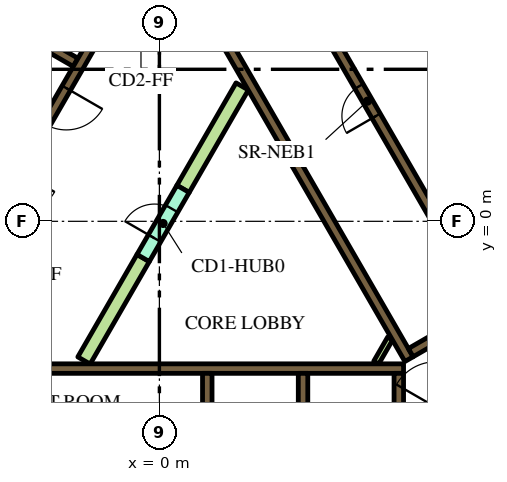
"""IFC4 building model, lengths in metres.
Left out: names, types, materials, properties, quantities, classifications, styles, units other than length and angle.
Written with IfcOpenShell. Run it as: python <this file> out.ifc"""

import sys

from ifc_helpers import new_model, si_unit, direction, frame, frame_2d, origin, place, context, subcontext, project, spatial, polyline, rectangle, outline, extrude, element, fill, save


model = new_model("IFC4")
c1 = context("Model", 3, precision=1e-05, world=origin(), true_north=direction((0.0, 1.0)))
c2 = subcontext(c1, "Body", "Model", "MODEL_VIEW")
j1 = project(units=[si_unit("LENGTHUNIT", "METRE"), si_unit("PLANEANGLEUNIT", "RADIAN")], contexts=[c1])
p1 = place(None, origin())
s1 = spatial("IfcSite", under=j1, at=p1, CompositionType="ELEMENT")
p2 = place(p1, origin())
s2 = spatial("IfcBuilding", under=s1, at=p2, CompositionType="ELEMENT")
p3 = place(p2, frame((0.0, 0.0, 31.5)))
s3 = spatial("IfcBuildingStorey", under=s2, at=p3, CompositionType="ELEMENT", Elevation=31.5)
p4 = place(p3, frame((6.711, 13.476, 0.0), z_axis=(0.0, 0.0, 1.0), x_axis=(0.500002723396, -0.866023831425, 0.0)))
e1 = element("IfcWall", 1, at=p4, inside=s3, PredefinedType="SOLIDWALL", context=c2, shape_type="SweptSolid", body=[
    extrude(rectangle(XDim=20.334, YDim=0.9, at=frame_2d((10.167, 0.0))), origin(), (0.0, 0.0, 1.0), 3.9),
])
p5 = place(p3, frame((-5.545, -3.875, 0.0), z_axis=(0.0, 0.0, 1.0), x_axis=(1.0, 0.0, 0.0)))
e2 = element("IfcWall", 2, at=p5, inside=s3, PredefinedType="SOLIDWALL", context=c2, shape_type="SweptSolid", body=[
    extrude(rectangle(XDim=11.97, YDim=0.25, at=frame_2d((5.985, 0.0))), origin(), (0.0, 0.0, 1.0), 3.9),
])
p6 = place(p3, frame((6.3, -7.268, 0.0), z_axis=(0.0, 0.0, 1.0), x_axis=(0.0, 1.0, 0.0)))
e3 = element("IfcWall", 3, at=p6, inside=s3, PredefinedType="SOLIDWALL", context=c2, shape_type="SweptSolid", body=[
    extrude(rectangle(XDim=3.268, YDim=0.25, at=frame_2d((1.634, 0.0))), origin(), (0.0, 0.0, 1.0), 3.9),
])
for number, where, z_axis, x_axis in (
    (4, (3.78, -4.0, 0.0), (0.0, 0.0, 1.0), (0.0, -1.0, 0.0)),
    (5, (1.26, -4.0, 0.0), (0.0, 0.0, 1.0), (0.0, -1.0, 0.0)),
):
    element("IfcWall", number, at=place(p3, frame(where, z_axis=z_axis, x_axis=x_axis)), inside=s3, PredefinedType="SOLIDWALL", context=c2, shape_type="SweptSolid", body=[
        extrude(rectangle(XDim=2.2, YDim=0.25, at=frame_2d((1.1, 0.0))), origin(), (0.0, 0.0, 1.0), 3.9),
    ])
p7 = place(p3, origin())
e6 = element("IfcWall", 6, at=p7, inside=s3, PredefinedType="SOLIDWALL", context=c2, shape_type="SweptSolid", body=[
    extrude(outline(polyline([(0.566, 6.725), (0.566, 6.875), (0.566, 6.875), (0.565, 6.875), (0.361, 6.875), (0.035, 7.439), (0.252, 7.564), (0.377, 7.348), (6.552, -3.348), (6.677, -3.564), (6.46, -3.689), (0.448, 6.725), (0.565, 6.725), (0.566, 6.725), (0.566, 6.725)])), origin(), (0.0, 0.0, 1.0), 3.9),
])
p8 = place(p3, frame((6.614, -3.456, 0.0), z_axis=(0.0, 0.0, 1.0), x_axis=(0.86602447079, 0.500001615989, 0.0)))
e7 = element("IfcWall", 7, at=p8, inside=s3, PredefinedType="SOLIDWALL", context=c2, shape_type="SweptSolid", body=[
    extrude(rectangle(XDim=3.154, YDim=0.25, at=frame_2d((1.577, 0.0))), origin(), (0.0, 0.0, 1.0), 3.9),
])
p9 = place(p3, frame((-8.06, -1.311, 0.0), z_axis=(0.0, 0.0, 1.0), x_axis=(0.50000273126, 0.866023826885, 0.0)))
e8 = element("IfcWall", 8, at=p9, inside=s3, PredefinedType="SOLIDWALL", context=c2, shape_type="SweptSolid", body=[
    extrude(rectangle(XDim=10.33, YDim=0.25, at=frame_2d((5.165, 0.0))), origin(), (0.0, 0.0, 1.0), 3.9),
])
p10 = place(p3, frame((-2.204, 4.182, 0.0), z_axis=(0.0, 0.0, 1.0), x_axis=(-0.866008176907, 0.50002983664, 0.0)))
e9 = element("IfcWall", 9, at=p10, inside=s3, PredefinedType="SOLIDWALL", context=c2, shape_type="SweptSolid", body=[
    extrude(rectangle(XDim=2.2, YDim=0.25, at=frame_2d((1.1, 0.0))), origin(), (0.0, 0.0, 1.0), 3.9),
])
p11 = place(p3, frame((5.705, -3.718, 0.0), z_axis=(0.0, 0.0, 1.0), x_axis=(0.499962090823, 0.866047289552, 0.0)))
e10 = element("IfcWall", 10, at=p11, inside=s3, PredefinedType="PARTITIONING", context=c2, shape_type="SweptSolid", body=[
    extrude(rectangle(XDim=0.735, YDim=0.15, at=frame_2d((0.367, 0.0))), origin(), (0.0, 0.0, 1.0), 2.75),
])
e11 = element("IfcWall", 11, at=p7, inside=s3, PredefinedType="PARTITIONING", context=c2, shape_type="SweptSolid", body=[
    extrude(outline(polyline([(-0.59, -0.872), (-0.265, -1.059), (-1.822, -3.756), (-2.147, -3.568), (-0.59, -0.872)])), origin(), (0.0, 0.0, 1.0), 2.75),
])
e12 = element("IfcWall", 12, at=p7, inside=s3, PredefinedType="PARTITIONING", context=c2, shape_type="SweptSolid", body=[
    extrude(outline(polyline([(2.017, 3.643), (2.342, 3.456), (0.785, 0.76), (0.46, 0.947), (2.017, 3.643)])), origin(), (0.0, 0.0, 1.0), 2.75),
])
p12 = place(p3, frame((11.553, -0.46, 0.0), z_axis=(0.0, 0.0, 1.0), x_axis=(-0.500006514828, 0.866021642414, 0.0)))
e13 = element("IfcWall", 13, at=p12, inside=s3, PredefinedType="SOLIDWALL", context=c2, shape_type="SweptSolid", body=[
    extrude(rectangle(XDim=12.35, YDim=0.25, at=frame_2d((6.175, 0.0))), origin(), (0.0, 0.0, 1.0), 3.9),
])
p13 = place(p12, frame((0.585, 0.0, 0.0)))
e14 = element("IfcOpeningElement", 14, at=p13, cuts=e13, PredefinedType="OPENING", context=c2, shape_type="SweptSolid", body=[
    extrude(rectangle(XDim=1.1, YDim=2.1, at=frame_2d((0.55, 1.05))), frame((0.0, 0.135, 0.0), z_axis=(0.0, -1.0, 0.0), x_axis=(1.0, 0.0, 0.0)), (0.0, 0.0, 1.0), 0.27),
])
p14 = place(p12, frame((3.105, 0.0, 0.0)))
e15 = element("IfcOpeningElement", 15, at=p14, cuts=e13, PredefinedType="OPENING", context=c2, shape_type="SweptSolid", body=[
    extrude(rectangle(XDim=1.1, YDim=2.1, at=frame_2d((0.55, 1.05))), frame((0.0, 0.135, 0.0), z_axis=(0.0, -1.0, 0.0), x_axis=(1.0, 0.0, 0.0)), (0.0, 0.0, 1.0), 0.27),
])
p15 = place(p12, frame((5.625, 0.0, 0.0)))
e16 = element("IfcOpeningElement", 16, at=p15, cuts=e13, PredefinedType="OPENING", context=c2, shape_type="SweptSolid", body=[
    extrude(rectangle(XDim=1.1, YDim=2.1, at=frame_2d((0.55, 1.05))), frame((0.0, 0.135, 0.0), z_axis=(0.0, -1.0, 0.0), x_axis=(1.0, 0.0, 0.0)), (0.0, 0.0, 1.0), 0.27),
])
p16 = place(p3, frame((8.565, -2.185, 0.0), z_axis=(0.0, 0.0, 1.0), x_axis=(-0.499997954832, 0.866026584559, 0.0)))
e17 = element("IfcWall", 17, at=p16, inside=s3, PredefinedType="SOLIDWALL", context=c2, shape_type="SweptSolid", body=[
    extrude(rectangle(XDim=12.35, YDim=0.25, at=frame_2d((6.175, 0.0))), origin(), (0.0, 0.0, 1.0), 3.9),
])
p17 = place(p16, frame((5.725, 0.0, 0.0)))
e18 = element("IfcOpeningElement", 18, at=p17, cuts=e17, PredefinedType="OPENING", context=c2, shape_type="SweptSolid", body=[
    extrude(rectangle(XDim=0.9, YDim=2.1, at=frame_2d((0.45, 1.05))), frame((0.0, 0.135, 0.0), z_axis=(0.0, -1.0, 0.0), x_axis=(1.0, 0.0, 0.0)), (0.0, 0.0, 1.0), 0.27),
])
p18 = place(p3, frame((-0.898, 6.194, 0.0), z_axis=(0.0, 0.0, 1.0), x_axis=(-0.499996202215, -0.866027596426, 0.0)))
e19 = element("IfcWall", 19, at=p18, inside=s3, PredefinedType="SOLIDWALL", context=c2, shape_type="SweptSolid", body=[
    extrude(rectangle(XDim=9.83, YDim=0.25, at=frame_2d((4.915, 0.0))), origin(), (0.0, 0.0, 1.0), 3.9),
])
p19 = place(p18, frame((0.585, 0.0, 0.0)))
e20 = element("IfcOpeningElement", 20, at=p19, cuts=e19, PredefinedType="OPENING", context=c2, shape_type="SweptSolid", body=[
    extrude(rectangle(XDim=1.1, YDim=2.1, at=frame_2d((0.55, 1.05))), frame((0.0, 0.135, 0.0), z_axis=(0.0, -1.0, 0.0), x_axis=(1.0, 0.0, 0.0)), (0.0, 0.0, 1.0), 0.27),
])
p20 = place(p18, frame((3.105, 0.0, 0.0)))
e21 = element("IfcOpeningElement", 21, at=p20, cuts=e19, PredefinedType="OPENING", context=c2, shape_type="SweptSolid", body=[
    extrude(rectangle(XDim=1.1, YDim=2.1, at=frame_2d((0.55, 1.05))), frame((0.0, 0.135, 0.0), z_axis=(0.0, -1.0, 0.0), x_axis=(1.0, 0.0, 0.0)), (0.0, 0.0, 1.0), 0.27),
])
p21 = place(p18, frame((5.625, 0.0, 0.0)))
e22 = element("IfcOpeningElement", 22, at=p21, cuts=e19, PredefinedType="OPENING", context=c2, shape_type="SweptSolid", body=[
    extrude(rectangle(XDim=1.1, YDim=2.1, at=frame_2d((0.55, 1.05))), frame((0.0, 0.135, 0.0), z_axis=(0.0, -1.0, 0.0), x_axis=(1.0, 0.0, 0.0)), (0.0, 0.0, 1.0), 0.27),
])
p22 = place(p18, frame((8.145, 0.0, 0.0)))
e23 = element("IfcOpeningElement", 23, at=p22, cuts=e19, PredefinedType="OPENING", context=c2, shape_type="SweptSolid", body=[
    extrude(rectangle(XDim=1.1, YDim=2.1, at=frame_2d((0.55, 1.05))), frame((0.0, 0.135, 0.0), z_axis=(0.0, -1.0, 0.0), x_axis=(1.0, 0.0, 0.0)), (0.0, 0.0, 1.0), 0.27),
])
p23 = place(p3, frame((7.053, -5.284, 0.0), z_axis=(0.0, 0.0, 1.0), x_axis=(0.500078061341, 0.865980330357, 0.0)))
e24 = element("IfcWall", 24, at=p23, inside=s3, PredefinedType="SOLIDWALL", context=c2, shape_type="SweptSolid", body=[
    extrude(rectangle(XDim=2.1, YDim=0.4, at=frame_2d((1.05, 0.0))), origin(), (0.0, 0.0, 1.0), 3.9),
])
p24 = place(p23, frame((0.45, 0.0, 0.0)))
e25 = element("IfcOpeningElement", 25, at=p24, cuts=e24, PredefinedType="OPENING", context=c2, shape_type="SweptSolid", body=[
    extrude(rectangle(XDim=1.2, YDim=2.1, at=frame_2d((0.6, 1.05))), frame((0.0, 0.21, 0.0), z_axis=(0.0, -1.0, 0.0), x_axis=(1.0, 0.0, 0.0)), (0.0, 0.0, 1.0), 0.42),
])
p25 = place(p3, frame((-0.427, -0.966, 0.0), z_axis=(0.0, 0.0, 1.0), x_axis=(0.49994051562, 0.866059744384, 0.0)))
e26 = element("IfcWall", 26, at=p25, inside=s3, PredefinedType="PARTITIONING", context=c2, shape_type="SweptSolid", body=[
    extrude(rectangle(XDim=2.1, YDim=0.375, at=frame_2d((1.05, 0.0))), origin(), (0.0, 0.0, 1.0), 2.75),
])
p26 = place(p25, frame((0.6, 0.0, 0.0)))
e27 = element("IfcOpeningElement", 27, at=p26, cuts=e26, PredefinedType="OPENING", context=c2, shape_type="SweptSolid", body=[
    extrude(rectangle(XDim=0.9, YDim=2.1, at=frame_2d((0.45, 1.05))), frame((0.0, 0.198, 0.0), z_axis=(0.0, -1.0, 0.0), x_axis=(1.0, 0.0, 0.0)), (0.0, 0.0, 1.0), 0.395),
])
p27 = place(p3, frame((6.163, 18.475, 0.0), z_axis=(0.0, 0.0, 1.0), x_axis=(0.500001317485, -0.866024643133, 0.0)))
e28 = element("IfcWall", 28, at=p27, inside=s3, PredefinedType="PARTITIONING", context=c2, shape_type="SweptSolid", body=[
    extrude(rectangle(XDim=25.767, YDim=0.15, at=frame_2d((12.883, 0.0))), origin(), (0.0, 0.0, 1.0), 2.75),
])
p28 = place(p27, frame((24.586, 0.0, 0.0)))
e29 = element("IfcOpeningElement", 29, at=p28, cuts=e28, PredefinedType="OPENING", context=c2, shape_type="SweptSolid", body=[
    extrude(rectangle(XDim=1.0, YDim=2.1, at=frame_2d((0.5, 1.05))), frame((0.0, 0.085, 0.0), z_axis=(0.0, -1.0, 0.0), x_axis=(1.0, 0.0, 0.0)), (0.0, 0.0, 1.0), 0.17),
])
p29 = place(p27, frame((19.319, 0.0, 0.0)))
e30 = element("IfcOpeningElement", 30, at=p29, cuts=e28, PredefinedType="OPENING", context=c2, shape_type="SweptSolid", body=[
    extrude(rectangle(XDim=1.0, YDim=2.1, at=frame_2d((0.5, 1.05))), frame((0.0, 0.085, 0.0), z_axis=(0.0, -1.0, 0.0), x_axis=(1.0, 0.0, 0.0)), (0.0, 0.0, 1.0), 0.17),
])
p30 = place(p27, frame((18.012, 0.0, 0.0)))
e31 = element("IfcOpeningElement", 31, at=p30, cuts=e28, PredefinedType="OPENING", context=c2, shape_type="SweptSolid", body=[
    extrude(rectangle(XDim=1.0, YDim=2.1, at=frame_2d((0.5, 1.05))), frame((0.0, 0.085, 0.0), z_axis=(0.0, -1.0, 0.0), x_axis=(1.0, 0.0, 0.0)), (0.0, 0.0, 1.0), 0.17),
])
p31 = place(p27, frame((6.824, 0.0, 0.0)))
e32 = element("IfcOpeningElement", 32, at=p31, cuts=e28, PredefinedType="OPENING", context=c2, shape_type="SweptSolid", body=[
    extrude(rectangle(XDim=1.1, YDim=2.1, at=frame_2d((0.55, 1.05))), frame((0.0, 0.085, 0.0), z_axis=(0.0, -1.0, 0.0), x_axis=(1.0, 0.0, 0.0)), (0.0, 0.0, 1.0), 0.17),
])
p32 = place(p27, frame((4.658, 0.0, 0.0)))
e33 = element("IfcOpeningElement", 33, at=p32, cuts=e28, PredefinedType="OPENING", context=c2, shape_type="SweptSolid", body=[
    extrude(rectangle(XDim=0.9, YDim=2.1, at=frame_2d((0.45, 1.05))), frame((0.0, 0.085, 0.0), z_axis=(0.0, -1.0, 0.0), x_axis=(1.0, 0.0, 0.0)), (0.0, 0.0, 1.0), 0.17),
])
p33 = place(p27, frame((0.18, 0.0, 0.0)))
e34 = element("IfcOpeningElement", 34, at=p33, cuts=e28, PredefinedType="OPENING", context=c2, shape_type="SweptSolid", body=[
    extrude(rectangle(XDim=1.0, YDim=2.1, at=frame_2d((0.5, 1.05))), frame((0.0, 0.085, 0.0), z_axis=(0.0, -1.0, 0.0), x_axis=(1.0, 0.0, 0.0)), (0.0, 0.0, 1.0), 0.17),
])
p34 = place(p17, origin())
e35 = element("IfcDoor", 35, at=p34, inside=s3, OperationType="SINGLE_SWING_LEFT", PredefinedType="DOOR", context=c2, shape_type="SweptSolid", body=[
    extrude(rectangle(XDim=0.9, YDim=2.1, at=frame_2d((0.45, 1.05))), frame((0.0, 0.025, 0.0), z_axis=(0.0, -1.0, 0.0), x_axis=(1.0, 0.0, 0.0)), (0.0, 0.0, 1.0), 0.05),
])
fill(e18, e35)
p35 = place(p20, origin())
e36 = element("IfcDoor", 36, at=p35, inside=s3, OperationType="DOUBLE_DOOR_SLIDING", PredefinedType="DOOR", context=c2, shape_type="SweptSolid", body=[
    extrude(rectangle(XDim=1.1, YDim=2.1, at=frame_2d((0.55, 1.05))), frame((0.0, 0.025, 0.0), z_axis=(0.0, -1.0, 0.0), x_axis=(1.0, 0.0, 0.0)), (0.0, 0.0, 1.0), 0.05),
])
fill(e21, e36)
p36 = place(p26, origin())
e37 = element("IfcDoor", 37, at=p36, inside=s3, OperationType="SINGLE_SWING_LEFT", PredefinedType="DOOR", context=c2, shape_type="SweptSolid", body=[
    extrude(rectangle(XDim=0.9, YDim=2.1, at=frame_2d((0.45, 1.05))), frame((0.0, 0.025, 0.0), z_axis=(0.0, -1.0, 0.0), x_axis=(1.0, 0.0, 0.0)), (0.0, 0.0, 1.0), 0.05),
])
fill(e27, e37)
save(model, sys.argv[1])
